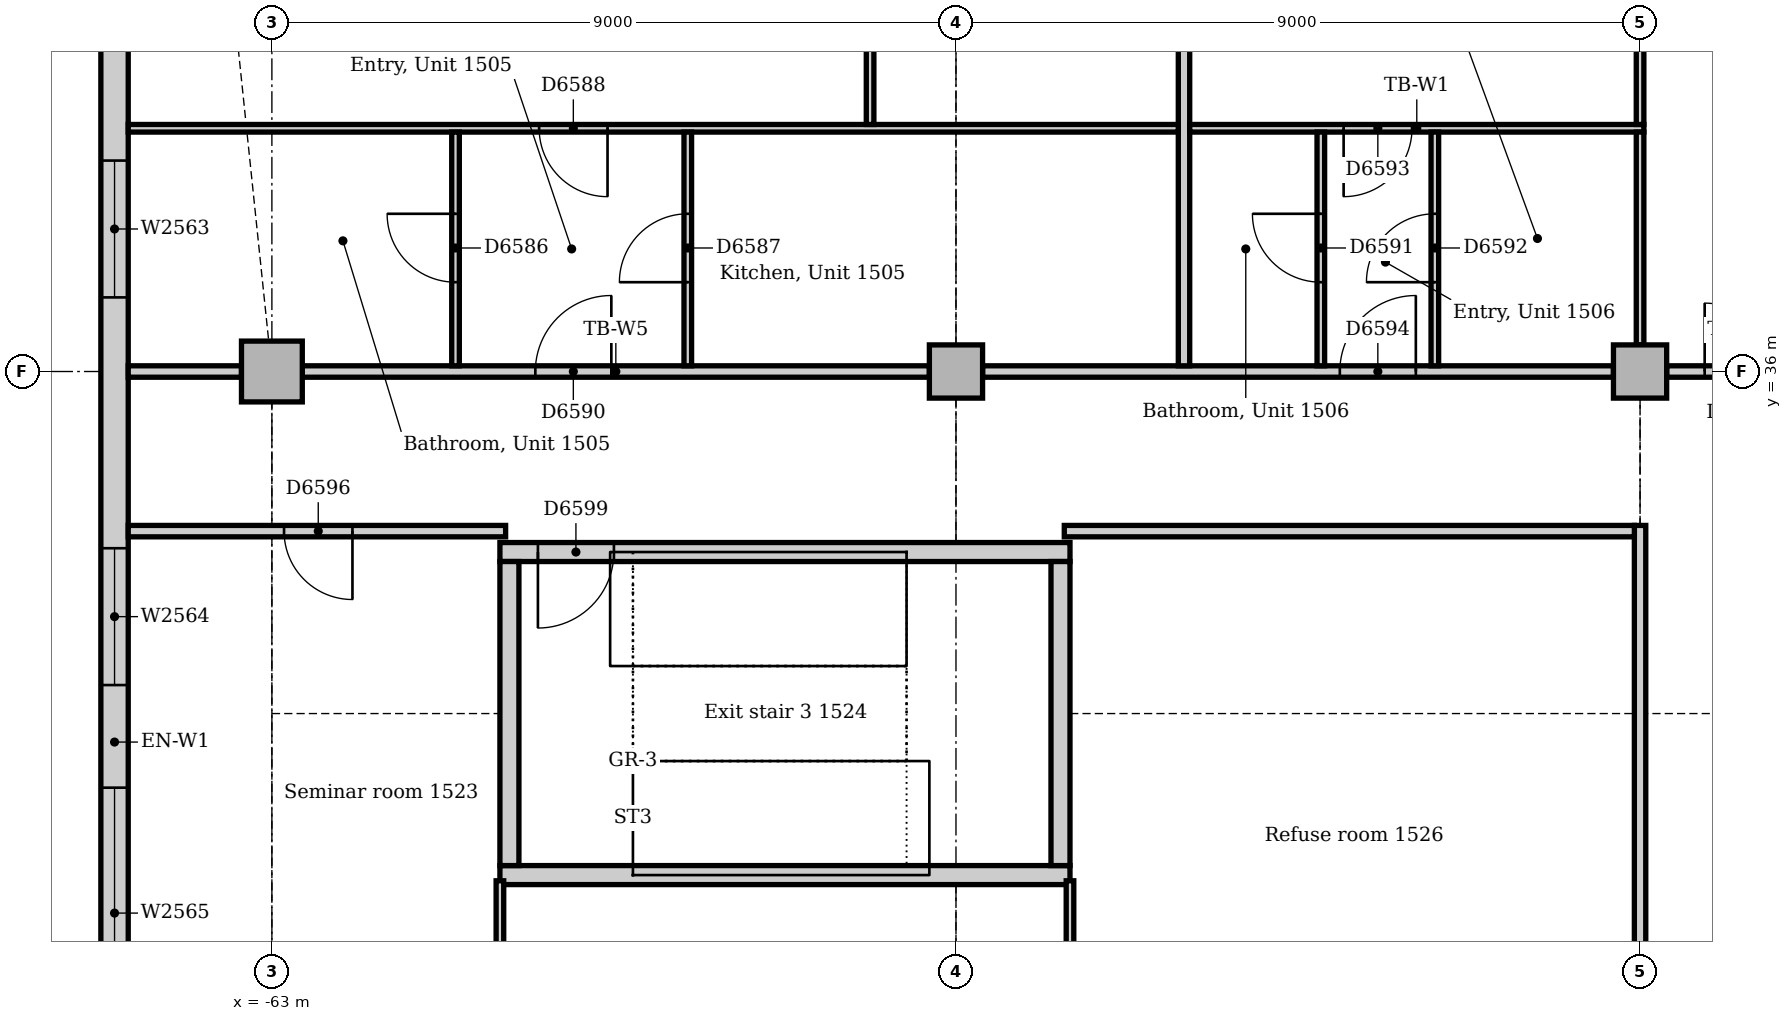
"""IFC4 building model, lengths in metres.
Left out: names, types, materials, properties, quantities, classifications, styles, units other than length and angle.
Written with IfcOpenShell. Run it as: python <this file> out.ifc"""

import sys

from ifc_helpers import new_model, si_unit, direction, frame, frame_2d, origin, origin_2d, place, context, subcontext, project, spatial, rectangle, extrude, element, fill, save


model = new_model("IFC4")
c1 = context("Model", 3, precision=1e-05, world=origin(), true_north=direction((0.0, 1.0)))
c2 = subcontext(c1, "Body", "Model", "MODEL_VIEW")
j1 = project(units=[si_unit("LENGTHUNIT", "METRE"), si_unit("PLANEANGLEUNIT", "RADIAN")], contexts=[c1])
p1 = place(None, origin())
s1 = spatial("IfcSite", under=j1, at=p1, CompositionType="ELEMENT")
p2 = place(p1, origin())
s2 = spatial("IfcBuilding", under=s1, at=p2, CompositionType="ELEMENT")
p3 = place(p2, frame((0.0, 0.0, 67.0)))
s3 = spatial("IfcBuildingStorey", under=s2, at=p3, CompositionType="ELEMENT", Elevation=67.0)
p4 = place(p3, frame((-60.0, 29.375, 0.0), z_axis=(0.0, 0.0, 1.0), x_axis=(1.0, 0.0, 0.0)))
e1 = element("IfcWall", 1, at=p4, inside=s3, PredefinedType="SOLIDWALL", context=c2, shape_type="SweptSolid", body=[
    extrude(rectangle(XDim=7.5, YDim=0.25, at=frame_2d((3.75, 0.0))), origin(), (0.0, 0.0, 1.0), 4.0),
])
p5 = place(p3, frame((-52.5, 33.625, 0.0), z_axis=(0.0, 0.0, 1.0), x_axis=(-1.0, 0.0, 0.0)))
e2 = element("IfcWall", 2, at=p5, inside=s3, PredefinedType="SOLIDWALL", context=c2, shape_type="SweptSolid", body=[
    extrude(rectangle(XDim=7.5, YDim=0.25, at=frame_2d((3.75, 0.0))), origin(), (0.0, 0.0, 1.0), 4.0),
])
p6 = place(p5, frame((6.0, 0.0, 0.0)))
e3 = element("IfcOpeningElement", 3, at=p6, cuts=e2, PredefinedType="OPENING", context=c2, shape_type="SweptSolid", body=[
    extrude(rectangle(XDim=1.0, YDim=2.1, at=frame_2d((0.5, 1.05))), frame((0.0, 0.135, 0.0), z_axis=(0.0, -1.0, 0.0), x_axis=(1.0, 0.0, 0.0)), (0.0, 0.0, 1.0), 0.27),
])
for number, where, z_axis, x_axis in (
    (4, (-52.625, 29.5, 0.0), (0.0, 0.0, 1.0), (0.0, 1.0, 0.0)),
    (5, (-59.875, 33.5, 0.0), (0.0, 0.0, 1.0), (0.0, -1.0, 0.0)),
):
    element("IfcWall", number, at=place(p3, frame(where, z_axis=z_axis, x_axis=x_axis)), inside=s3, PredefinedType="SOLIDWALL", context=c2, shape_type="SweptSolid", body=[
        extrude(rectangle(XDim=4.0, YDim=0.25, at=frame_2d((2.0, 0.0))), origin(), (0.0, 0.0, 1.0), 4.0),
    ])
p7 = place(p3, frame((-63.0, 36.0, 0.0), z_axis=(0.0, 0.0, 1.0), x_axis=(1.0, 0.0, 0.0)))
e6 = element("IfcColumn", 6, at=p7, inside=s3, PredefinedType="COLUMN", context=c2, shape_type="SweptSolid", body=[
    extrude(rectangle(XDim=0.8, YDim=0.8, at=origin_2d()), origin(), (0.0, 0.0, 1.0), 3.85),
])
for number, where, z_axis, x_axis in (
    (7, (-54.0, 36.0, 0.0), (0.0, 0.0, 1.0), (1.0, 0.0, 0.0)),
    (8, (-45.0, 36.0, 0.0), (0.0, 0.0, 1.0), (1.0, 0.0, 0.0)),
):
    element("IfcColumn", number, at=place(p3, frame(where, z_axis=z_axis, x_axis=x_axis)), inside=s3, PredefinedType="COLUMN", context=c2, shape_type="SweptSolid", body=[
        extrude(rectangle(XDim=0.7, YDim=0.7, at=origin_2d()), origin(), (0.0, 0.0, 1.0), 3.85),
    ])
p8 = place(p3, frame((-65.07, 43.007, 0.0), z_axis=(0.0, 0.0, 1.0), x_axis=(0.0, -1.0, 0.0)))
e9 = element("IfcWall", 9, at=p8, inside=s3, PredefinedType="STANDARD", context=c2, shape_type="SweptSolid", body=[
    extrude(rectangle(XDim=23.765, YDim=0.36, at=frame_2d((11.882, 0.0))), origin(), (0.0, 0.0, 1.0), 3.85),
])
p9 = place(p8, frame((4.232, 0.0, 0.9)))
e10 = element("IfcOpeningElement", 10, at=p9, cuts=e9, PredefinedType="OPENING", context=c2, shape_type="SweptSolid", body=[
    extrude(rectangle(XDim=1.8, YDim=1.6, at=frame_2d((0.9, 0.8))), frame((0.0, 0.19, 0.0), z_axis=(0.0, -1.0, 0.0), x_axis=(1.0, 0.0, 0.0)), (0.0, 0.0, 1.0), 0.38),
])
p10 = place(p8, frame((9.332, 0.0, 0.9)))
e11 = element("IfcOpeningElement", 11, at=p10, cuts=e9, PredefinedType="OPENING", context=c2, shape_type="SweptSolid", body=[
    extrude(rectangle(XDim=1.8, YDim=1.6, at=frame_2d((0.9, 0.8))), frame((0.0, 0.19, 0.0), z_axis=(0.0, -1.0, 0.0), x_axis=(1.0, 0.0, 0.0)), (0.0, 0.0, 1.0), 0.38),
])
p11 = place(p8, frame((12.482, 0.0, 0.9)))
e12 = element("IfcOpeningElement", 12, at=p11, cuts=e9, PredefinedType="OPENING", context=c2, shape_type="SweptSolid", body=[
    extrude(rectangle(XDim=3.3, YDim=1.6, at=frame_2d((1.65, 0.8))), frame((0.0, 0.19, 0.0), z_axis=(0.0, -1.0, 0.0), x_axis=(1.0, 0.0, 0.0)), (0.0, 0.0, 1.0), 0.38),
])
p12 = place(p8, frame((16.982, 0.0, 0.9)))
e13 = element("IfcOpeningElement", 13, at=p12, cuts=e9, PredefinedType="OPENING", context=c2, shape_type="SweptSolid", body=[
    extrude(rectangle(XDim=3.3, YDim=1.6, at=frame_2d((1.65, 0.8))), frame((0.0, 0.19, 0.0), z_axis=(0.0, -1.0, 0.0), x_axis=(1.0, 0.0, 0.0)), (0.0, 0.0, 1.0), 0.38),
])
p13 = place(p3, frame((-44.65, 36.0, 0.0), z_axis=(0.0, 0.0, 1.0), x_axis=(1.0, 0.0, 0.0)))
e14 = element("IfcWall", 14, at=p13, inside=s3, PredefinedType="PARTITIONING", context=c2, shape_type="SweptSolid", body=[
    extrude(rectangle(XDim=1.925, YDim=0.15, at=frame_2d((0.963, 0.0))), origin(), (0.0, 0.0, 1.0), 3.602),
])
p14 = place(p13, frame((0.5, 0.0, 0.0)))
e15 = element("IfcOpeningElement", 15, at=p14, cuts=e14, PredefinedType="OPENING", context=c2, shape_type="SweptSolid", body=[
    extrude(rectangle(XDim=0.9, YDim=2.1, at=frame_2d((0.45, 1.05))), frame((0.0, 0.085, 0.0), z_axis=(0.0, -1.0, 0.0), x_axis=(1.0, 0.0, 0.0)), (0.0, 0.0, 1.0), 0.17),
])
p15 = place(p3, frame((-53.65, 36.0, 0.0), z_axis=(0.0, 0.0, 1.0), x_axis=(1.0, 0.0, 0.0)))
e16 = element("IfcWall", 16, at=p15, inside=s3, PredefinedType="PARTITIONING", context=c2, shape_type="SweptSolid", body=[
    extrude(rectangle(XDim=8.3, YDim=0.15, at=frame_2d((4.15, 0.0))), origin(), (0.0, 0.0, 1.0), 3.158),
])
p16 = place(p15, frame((4.7, 0.0, 0.0)))
e17 = element("IfcOpeningElement", 17, at=p16, cuts=e16, PredefinedType="OPENING", context=c2, shape_type="SweptSolid", body=[
    extrude(rectangle(XDim=1.0, YDim=2.1, at=frame_2d((0.5, 1.05))), frame((0.0, 0.085, 0.0), z_axis=(0.0, -1.0, 0.0), x_axis=(1.0, 0.0, 0.0)), (0.0, 0.0, 1.0), 0.17),
])
p17 = place(p3, frame((-62.6, 36.0, 0.0), z_axis=(0.0, 0.0, 1.0), x_axis=(1.0, 0.0, 0.0)))
e18 = element("IfcWall", 18, at=p17, inside=s3, PredefinedType="PARTITIONING", context=c2, shape_type="SweptSolid", body=[
    extrude(rectangle(XDim=8.25, YDim=0.15, at=frame_2d((4.125, 0.0))), origin(), (0.0, 0.0, 1.0), 3.158),
])
p18 = place(p17, frame((3.066, 0.0, 0.0)))
e19 = element("IfcOpeningElement", 19, at=p18, cuts=e18, PredefinedType="OPENING", context=c2, shape_type="SweptSolid", body=[
    extrude(rectangle(XDim=1.0, YDim=2.1, at=frame_2d((0.5, 1.05))), frame((0.0, 0.085, 0.0), z_axis=(0.0, -1.0, 0.0), x_axis=(1.0, 0.0, 0.0)), (0.0, 0.0, 1.0), 0.17),
])
p19 = place(p3, frame((-64.89, 36.0, 0.0), z_axis=(0.0, 0.0, 1.0), x_axis=(1.0, 0.0, 0.0)))
e20 = element("IfcWall", 20, at=p19, inside=s3, PredefinedType="PARTITIONING", context=c2, shape_type="SweptSolid", body=[
    extrude(rectangle(XDim=1.49, YDim=0.15, at=frame_2d((0.745, 0.0))), origin(), (0.0, 0.0, 1.0), 3.85),
])
p20 = place(p3, frame((-45.0, 27.35, 0.0), z_axis=(0.0, 0.0, 1.0), x_axis=(0.0, 1.0, 0.0)))
e21 = element("IfcWall", 21, at=p20, inside=s3, PredefinedType="PARTITIONING", context=c2, shape_type="SweptSolid", body=[
    extrude(rectangle(XDim=6.625, YDim=0.15, at=frame_2d((3.312, 0.0))), origin(), (0.0, 0.0, 1.0), 3.256),
])
p21 = place(p3, frame((-52.575, 33.9, 0.0), z_axis=(0.0, 0.0, 1.0), x_axis=(1.0, 0.0, 0.0)))
e22 = element("IfcWall", 22, at=p21, inside=s3, PredefinedType="PARTITIONING", context=c2, shape_type="SweptSolid", body=[
    extrude(rectangle(XDim=7.5, YDim=0.15, at=frame_2d((3.75, 0.0))), origin(), (0.0, 0.0, 1.0), 3.85),
])
p22 = place(p3, frame((-64.89, 33.9, 0.0), z_axis=(0.0, 0.0, 1.0), x_axis=(1.0, 0.0, 0.0)))
e23 = element("IfcWall", 23, at=p22, inside=s3, PredefinedType="PARTITIONING", context=c2, shape_type="SweptSolid", body=[
    extrude(rectangle(XDim=4.965, YDim=0.15, at=frame_2d((2.482, 0.0))), origin(), (0.0, 0.0, 1.0), 3.85),
])
p23 = place(p22, frame((2.05, 0.0, 0.0)))
e24 = element("IfcOpeningElement", 24, at=p23, cuts=e23, PredefinedType="OPENING", context=c2, shape_type="SweptSolid", body=[
    extrude(rectangle(XDim=0.9, YDim=2.1, at=frame_2d((0.45, 1.05))), frame((0.0, 0.085, 0.0), z_axis=(0.0, -1.0, 0.0), x_axis=(1.0, 0.0, 0.0)), (0.0, 0.0, 1.0), 0.17),
])
p24 = place(p3, frame((-51.0, 36.075, 0.0), z_axis=(0.0, 0.0, 1.0), x_axis=(0.0, 1.0, 0.0)))
e25 = element("IfcWall", 25, at=p24, inside=s3, PredefinedType="PARTITIONING", context=c2, shape_type="SweptSolid", body=[
    extrude(rectangle(XDim=10.815, YDim=0.15, at=frame_2d((5.407, 0.0))), origin(), (0.0, 0.0, 1.0), 3.85),
])
p25 = place(p3, frame((-50.925, 39.2, 0.0), z_axis=(0.0, 0.0, 1.0), x_axis=(1.0, 0.0, 0.0)))
e26 = element("IfcWall", 26, at=p25, inside=s3, PredefinedType="PARTITIONING", context=c2, shape_type="SweptSolid", body=[
    extrude(rectangle(XDim=5.975, YDim=0.1, at=frame_2d((2.987, 0.0))), origin(), (0.0, 0.0, 1.0), 3.85),
])
p26 = place(p25, frame((2.025, 0.0, 0.0)))
e27 = element("IfcOpeningElement", 27, at=p26, cuts=e26, PredefinedType="OPENING", context=c2, shape_type="SweptSolid", body=[
    extrude(rectangle(XDim=0.9, YDim=2.1, at=frame_2d((0.45, 1.05))), frame((0.0, 0.06, 0.0), z_axis=(0.0, -1.0, 0.0), x_axis=(1.0, 0.0, 0.0)), (0.0, 0.0, 1.0), 0.12),
])
p27 = place(p3, frame((-64.89, 39.2, 0.0), z_axis=(0.0, 0.0, 1.0), x_axis=(1.0, 0.0, 0.0)))
e28 = element("IfcWall", 28, at=p27, inside=s3, PredefinedType="PARTITIONING", context=c2, shape_type="SweptSolid", body=[
    extrude(rectangle(XDim=13.815, YDim=0.1, at=frame_2d((6.907, 0.0))), origin(), (0.0, 0.0, 1.0), 3.85),
])
p28 = place(p27, frame((5.406, 0.0, 0.0)))
e29 = element("IfcOpeningElement", 29, at=p28, cuts=e28, PredefinedType="OPENING", context=c2, shape_type="SweptSolid", body=[
    extrude(rectangle(XDim=0.9, YDim=2.1, at=frame_2d((0.45, 1.05))), frame((0.0, 0.06, 0.0), z_axis=(0.0, -1.0, 0.0), x_axis=(1.0, 0.0, 0.0)), (0.0, 0.0, 1.0), 0.12),
])
p29 = place(p3, frame((-45.0, 39.25, 0.0), z_axis=(0.0, 0.0, 1.0), x_axis=(0.0, 1.0, 0.0)))
e30 = element("IfcWall", 30, at=p29, inside=s3, PredefinedType="PARTITIONING", context=c2, shape_type="SweptSolid", body=[
    extrude(rectangle(XDim=6.7, YDim=0.1, at=frame_2d((3.35, 0.0))), origin(), (0.0, 0.0, 1.0), 3.256),
])
p30 = place(p3, frame((-45.0, 36.35, 0.0), z_axis=(0.0, 0.0, 1.0), x_axis=(0.0, 1.0, 0.0)))
e31 = element("IfcWall", 31, at=p30, inside=s3, PredefinedType="PARTITIONING", context=c2, shape_type="SweptSolid", body=[
    extrude(rectangle(XDim=2.8, YDim=0.1, at=frame_2d((1.4, 0.0))), origin(), (0.0, 0.0, 1.0), 3.256),
])
for number, where, z_axis, x_axis in (
    (32, (-60.0, 20.075, 0.0), (0.0, 0.0, 1.0), (0.0, 1.0, 0.0)),
    (33, (-52.5, 20.075, 0.0), (0.0, 0.0, 1.0), (0.0, 1.0, 0.0)),
):
    element("IfcWall", number, at=place(p3, frame(where, z_axis=z_axis, x_axis=x_axis)), inside=s3, PredefinedType="PARTITIONING", context=c2, shape_type="SweptSolid", body=[
        extrude(rectangle(XDim=9.225, YDim=0.1, at=frame_2d((4.612, 0.0))), origin(), (0.0, 0.0, 1.0), 3.85),
    ])
p31 = place(p3, frame((-55.13, 39.25, 0.0), z_axis=(0.0, 0.0, 1.0), x_axis=(0.0, 1.0, 0.0)))
e34 = element("IfcWall", 34, at=p31, inside=s3, PredefinedType="PARTITIONING", context=c2, shape_type="SweptSolid", body=[
    extrude(rectangle(XDim=7.64, YDim=0.1, at=frame_2d((3.82, 0.0))), origin(), (0.0, 0.0, 1.0), 3.85),
])
p32 = place(p31, frame((3.35, 0.0, 0.0)))
e35 = element("IfcOpeningElement", 35, at=p32, cuts=e34, PredefinedType="OPENING", context=c2, shape_type="SweptSolid", body=[
    extrude(rectangle(XDim=0.9, YDim=2.1, at=frame_2d((0.45, 1.05))), frame((0.0, 0.06, 0.0), z_axis=(0.0, -1.0, 0.0), x_axis=(1.0, 0.0, 0.0)), (0.0, 0.0, 1.0), 0.12),
])
p33 = place(p3, frame((-60.584, 36.075, 0.0), z_axis=(0.0, 0.0, 1.0), x_axis=(0.0, 1.0, 0.0)))
e36 = element("IfcWall", 36, at=p33, inside=s3, PredefinedType="PARTITIONING", context=c2, shape_type="SweptSolid", body=[
    extrude(rectangle(XDim=3.075, YDim=0.1, at=frame_2d((1.538, 0.0))), origin(), (0.0, 0.0, 1.0), 3.85),
])
p34 = place(p33, frame((1.1, 0.0, 0.0)))
e37 = element("IfcOpeningElement", 37, at=p34, cuts=e36, PredefinedType="OPENING", context=c2, shape_type="SweptSolid", body=[
    extrude(rectangle(XDim=0.9, YDim=2.1, at=frame_2d((0.45, 1.05))), frame((0.0, 0.06, 0.0), z_axis=(0.0, -1.0, 0.0), x_axis=(1.0, 0.0, 0.0)), (0.0, 0.0, 1.0), 0.12),
])
p35 = place(p3, frame((-57.528, 36.075, 0.0), z_axis=(0.0, 0.0, 1.0), x_axis=(0.0, 1.0, 0.0)))
e38 = element("IfcWall", 38, at=p35, inside=s3, PredefinedType="PARTITIONING", context=c2, shape_type="SweptSolid", body=[
    extrude(rectangle(XDim=3.075, YDim=0.1, at=frame_2d((1.538, 0.0))), origin(), (0.0, 0.0, 1.0), 3.85),
])
p36 = place(p35, frame((1.1, 0.0, 0.0)))
e39 = element("IfcOpeningElement", 39, at=p36, cuts=e38, PredefinedType="OPENING", context=c2, shape_type="SweptSolid", body=[
    extrude(rectangle(XDim=0.9, YDim=2.1, at=frame_2d((0.45, 1.05))), frame((0.0, 0.06, 0.0), z_axis=(0.0, -1.0, 0.0), x_axis=(1.0, 0.0, 0.0)), (0.0, 0.0, 1.0), 0.12),
])
p37 = place(p3, frame((-49.2, 36.075, 0.0), z_axis=(0.0, 0.0, 1.0), x_axis=(0.0, 1.0, 0.0)))
e40 = element("IfcWall", 40, at=p37, inside=s3, PredefinedType="PARTITIONING", context=c2, shape_type="SweptSolid", body=[
    extrude(rectangle(XDim=3.075, YDim=0.1, at=frame_2d((1.538, 0.0))), origin(), (0.0, 0.0, 1.0), 3.85),
])
p38 = place(p37, frame((1.1, 0.0, 0.0)))
e41 = element("IfcOpeningElement", 41, at=p38, cuts=e40, PredefinedType="OPENING", context=c2, shape_type="SweptSolid", body=[
    extrude(rectangle(XDim=0.9, YDim=2.1, at=frame_2d((0.45, 1.05))), frame((0.0, 0.06, 0.0), z_axis=(0.0, -1.0, 0.0), x_axis=(1.0, 0.0, 0.0)), (0.0, 0.0, 1.0), 0.12),
])
p39 = place(p3, frame((-47.7, 36.075, 0.0), z_axis=(0.0, 0.0, 1.0), x_axis=(0.0, 1.0, 0.0)))
e42 = element("IfcWall", 42, at=p39, inside=s3, PredefinedType="PARTITIONING", context=c2, shape_type="SweptSolid", body=[
    extrude(rectangle(XDim=3.075, YDim=0.1, at=frame_2d((1.538, 0.0))), origin(), (0.0, 0.0, 1.0), 3.85),
])
p40 = place(p39, frame((1.1, 0.0, 0.0)))
e43 = element("IfcOpeningElement", 43, at=p40, cuts=e42, PredefinedType="OPENING", context=c2, shape_type="SweptSolid", body=[
    extrude(rectangle(XDim=0.9, YDim=2.1, at=frame_2d((0.45, 1.05))), frame((0.0, 0.06, 0.0), z_axis=(0.0, -1.0, 0.0), x_axis=(1.0, 0.0, 0.0)), (0.0, 0.0, 1.0), 0.12),
])
p41 = place(p9, origin())
e44 = element("IfcWindow", 44, at=p41, inside=s3, PartitioningType="SINGLE_PANEL", PredefinedType="WINDOW", context=c2, shape_type="SweptSolid", body=[
    extrude(rectangle(XDim=1.8, YDim=1.6, at=frame_2d((0.9, 0.8))), frame((0.0, 0.13, 0.0), z_axis=(0.0, -1.0, 0.0), x_axis=(1.0, 0.0, 0.0)), (0.0, 0.0, 1.0), 0.06),
])
fill(e10, e44)
p42 = place(p10, origin())
e45 = element("IfcWindow", 45, at=p42, inside=s3, PartitioningType="SINGLE_PANEL", PredefinedType="WINDOW", context=c2, shape_type="SweptSolid", body=[
    extrude(rectangle(XDim=1.8, YDim=1.6, at=frame_2d((0.9, 0.8))), frame((0.0, 0.13, 0.0), z_axis=(0.0, -1.0, 0.0), x_axis=(1.0, 0.0, 0.0)), (0.0, 0.0, 1.0), 0.06),
])
fill(e11, e45)
p43 = place(p11, origin())
e46 = element("IfcWindow", 46, at=p43, inside=s3, PartitioningType="SINGLE_PANEL", PredefinedType="WINDOW", context=c2, shape_type="SweptSolid", body=[
    extrude(rectangle(XDim=3.3, YDim=1.6, at=frame_2d((1.65, 0.8))), frame((0.0, 0.13, 0.0), z_axis=(0.0, -1.0, 0.0), x_axis=(1.0, 0.0, 0.0)), (0.0, 0.0, 1.0), 0.06),
])
fill(e12, e46)
p44 = place(p14, origin())
e47 = element("IfcDoor", 47, at=p44, inside=s3, OperationType="SINGLE_SWING_LEFT", PredefinedType="DOOR", context=c2, shape_type="SweptSolid", body=[
    extrude(rectangle(XDim=0.9, YDim=2.1, at=frame_2d((0.45, 1.05))), frame((0.0, 0.025, 0.0), z_axis=(0.0, -1.0, 0.0), x_axis=(1.0, 0.0, 0.0)), (0.0, 0.0, 1.0), 0.05),
])
fill(e15, e47)
p45 = place(p34, origin())
e48 = element("IfcDoor", 48, at=p45, inside=s3, OperationType="SINGLE_SWING_RIGHT", PredefinedType="DOOR", context=c2, shape_type="SweptSolid", body=[
    extrude(rectangle(XDim=0.9, YDim=2.1, at=frame_2d((0.45, 1.05))), frame((0.0, 0.025, 0.0), z_axis=(0.0, -1.0, 0.0), x_axis=(1.0, 0.0, 0.0)), (0.0, 0.0, 1.0), 0.05),
])
fill(e37, e48)
p46 = place(p36, origin())
e49 = element("IfcDoor", 49, at=p46, inside=s3, OperationType="SINGLE_SWING_LEFT", PredefinedType="DOOR", context=c2, shape_type="SweptSolid", body=[
    extrude(rectangle(XDim=0.9, YDim=2.1, at=frame_2d((0.45, 1.05))), frame((0.0, 0.025, 0.0), z_axis=(0.0, -1.0, 0.0), x_axis=(1.0, 0.0, 0.0)), (0.0, 0.0, 1.0), 0.05),
])
fill(e39, e49)
p47 = place(p28, frame((0.9, 0.0, 0.0), z_axis=(0.0, 0.0, 1.0), x_axis=(-1.0, 0.0, 0.0)))
e50 = element("IfcDoor", 50, at=p47, inside=s3, OperationType="SINGLE_SWING_LEFT", PredefinedType="DOOR", context=c2, shape_type="SweptSolid", body=[
    extrude(rectangle(XDim=0.9, YDim=2.1, at=frame_2d((0.45, 1.05))), frame((0.0, 0.025, 0.0), z_axis=(0.0, -1.0, 0.0), x_axis=(1.0, 0.0, 0.0)), (0.0, 0.0, 1.0), 0.05),
])
fill(e29, e50)
p48 = place(p18, origin())
e51 = element("IfcDoor", 51, at=p48, inside=s3, OperationType="SINGLE_SWING_RIGHT", PredefinedType="DOOR", context=c2, shape_type="SweptSolid", body=[
    extrude(rectangle(XDim=1.0, YDim=2.1, at=frame_2d((0.5, 1.05))), frame((0.0, 0.025, 0.0), z_axis=(0.0, -1.0, 0.0), x_axis=(1.0, 0.0, 0.0)), (0.0, 0.0, 1.0), 0.05),
])
fill(e19, e51)
p49 = place(p38, origin())
e52 = element("IfcDoor", 52, at=p49, inside=s3, OperationType="SINGLE_SWING_RIGHT", PredefinedType="DOOR", context=c2, shape_type="SweptSolid", body=[
    extrude(rectangle(XDim=0.9, YDim=2.1, at=frame_2d((0.45, 1.05))), frame((0.0, 0.025, 0.0), z_axis=(0.0, -1.0, 0.0), x_axis=(1.0, 0.0, 0.0)), (0.0, 0.0, 1.0), 0.05),
])
fill(e41, e52)
p50 = place(p40, origin())
e53 = element("IfcDoor", 53, at=p50, inside=s3, OperationType="SINGLE_SWING_LEFT", PredefinedType="DOOR", context=c2, shape_type="SweptSolid", body=[
    extrude(rectangle(XDim=0.9, YDim=2.1, at=frame_2d((0.45, 1.05))), frame((0.0, 0.025, 0.0), z_axis=(0.0, -1.0, 0.0), x_axis=(1.0, 0.0, 0.0)), (0.0, 0.0, 1.0), 0.05),
])
fill(e43, e53)
p51 = place(p26, frame((0.9, 0.0, 0.0), z_axis=(0.0, 0.0, 1.0), x_axis=(-1.0, 0.0, 0.0)))
e54 = element("IfcDoor", 54, at=p51, inside=s3, OperationType="SINGLE_SWING_RIGHT", PredefinedType="DOOR", context=c2, shape_type="SweptSolid", body=[
    extrude(rectangle(XDim=0.9, YDim=2.1, at=frame_2d((0.45, 1.05))), frame((0.0, 0.025, 0.0), z_axis=(0.0, -1.0, 0.0), x_axis=(1.0, 0.0, 0.0)), (0.0, 0.0, 1.0), 0.05),
])
fill(e27, e54)
p52 = place(p16, origin())
e55 = element("IfcDoor", 55, at=p52, inside=s3, OperationType="SINGLE_SWING_RIGHT", PredefinedType="DOOR", context=c2, shape_type="SweptSolid", body=[
    extrude(rectangle(XDim=1.0, YDim=2.1, at=frame_2d((0.5, 1.05))), frame((0.0, 0.025, 0.0), z_axis=(0.0, -1.0, 0.0), x_axis=(1.0, 0.0, 0.0)), (0.0, 0.0, 1.0), 0.05),
])
fill(e17, e55)
p53 = place(p23, frame((0.9, 0.0, 0.0), z_axis=(0.0, 0.0, 1.0), x_axis=(-1.0, 0.0, 0.0)))
e56 = element("IfcDoor", 56, at=p53, inside=s3, OperationType="SINGLE_SWING_LEFT", PredefinedType="DOOR", context=c2, shape_type="SweptSolid", body=[
    extrude(rectangle(XDim=0.9, YDim=2.1, at=frame_2d((0.45, 1.05))), frame((0.0, 0.025, 0.0), z_axis=(0.0, -1.0, 0.0), x_axis=(1.0, 0.0, 0.0)), (0.0, 0.0, 1.0), 0.05),
])
fill(e24, e56)
p54 = place(p6, origin())
e57 = element("IfcDoor", 57, at=p54, inside=s3, OperationType="SINGLE_SWING_RIGHT", PredefinedType="DOOR", context=c2, shape_type="SweptSolid", body=[
    extrude(rectangle(XDim=1.0, YDim=2.1, at=frame_2d((0.5, 1.05))), frame((0.0, 0.025, 0.0), z_axis=(0.0, -1.0, 0.0), x_axis=(1.0, 0.0, 0.0)), (0.0, 0.0, 1.0), 0.05),
])
fill(e3, e57)
save(model, sys.argv[1])
